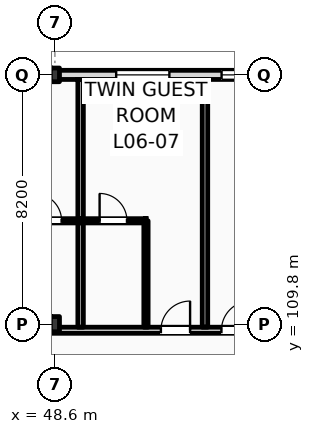
"""IFC4 building model, lengths in metres.
Left out: names, types, materials, properties, quantities, classifications, styles, units other than length and angle.
Written with IfcOpenShell. Run it as: python <this file> out.ifc"""

import sys

from ifc_helpers import new_model, si_unit, direction, frame, frame_2d, origin, origin_2d, place, context, subcontext, project, spatial, rectangle, i_section, extrude, element, fill, save


model = new_model("IFC4")
c1 = context("Model", 3, precision=1e-05, world=origin(), true_north=direction((0.0, 1.0)))
c2 = subcontext(c1, "Body", "Model", "MODEL_VIEW")
j1 = project(units=[si_unit("LENGTHUNIT", "METRE"), si_unit("PLANEANGLEUNIT", "RADIAN")], contexts=[c1])
p1 = place(None, origin())
s1 = spatial("IfcSite", under=j1, at=p1, CompositionType="ELEMENT")
p2 = place(p1, origin())
s2 = spatial("IfcBuilding", under=s1, at=p2, CompositionType="ELEMENT")
p3 = place(p2, frame((0.0, 0.0, 28.2)))
s3 = spatial("IfcBuildingStorey", under=s2, at=p3, CompositionType="ELEMENT", Elevation=28.2)
p4 = place(p3, frame((48.6, 109.8, 0.0), z_axis=(0.0, 0.0, 1.0), x_axis=(1.0, 0.0, 0.0)))
e1 = element("IfcColumn", 1, at=p4, inside=s3, PredefinedType="COLUMN", context=c2, shape_type="SweptSolid", body=[
    extrude(i_section(OverallWidth=0.3, OverallDepth=0.5, WebThickness=0.014, FlangeThickness=0.028, FilletRadius=0.027, at=origin_2d()), origin(), (0.0, 0.0, 1.0), 3.6),
])
p5 = place(p3, frame((48.6, 118.0, 0.0), z_axis=(0.0, 0.0, 1.0), x_axis=(1.0, 0.0, 0.0)))
e2 = element("IfcColumn", 2, at=p5, inside=s3, PredefinedType="COLUMN", context=c2, shape_type="SweptSolid", body=[
    extrude(i_section(OverallWidth=0.3, OverallDepth=0.45, WebThickness=0.014, FlangeThickness=0.026, FilletRadius=0.027, at=origin_2d()), origin(), (0.0, 0.0, 1.0), 3.6),
])
p6 = place(p3, frame((22.5, 118.0, 0.0), z_axis=(0.0, 0.0, 1.0), x_axis=(1.0, 0.0, 0.0)))
e3 = element("IfcWall", 3, at=p6, inside=s3, PredefinedType="STANDARD", context=c2, shape_type="SweptSolid", body=[
    extrude(rectangle(XDim=97.5, YDim=0.3, at=frame_2d((48.75, 0.0))), origin(), (0.0, 0.0, 1.0), 2.8),
])
p7 = place(p6, frame((0.91, 0.0, 0.9)))
e4 = element("IfcOpeningElement", 4, at=p7, cuts=e3, PredefinedType="OPENING", context=c2, shape_type="SweptSolid", body=[
    extrude(rectangle(XDim=0.9, YDim=1.72, at=frame_2d((0.45, 0.86))), frame((0.0, 0.16, 0.0), z_axis=(0.0, -1.0, 0.0), x_axis=(1.0, 0.0, 0.0)), (0.0, 0.0, 1.0), 0.32),
])
p8 = place(p6, frame((6.561, 0.0, 0.0)))
e5 = element("IfcOpeningElement", 5, at=p8, cuts=e3, PredefinedType="OPENING", context=c2, shape_type="SweptSolid", body=[
    extrude(rectangle(XDim=1.2, YDim=2.25, at=frame_2d((0.6, 1.125))), frame((0.0, 0.16, 0.0), z_axis=(0.0, -1.0, 0.0), x_axis=(1.0, 0.0, 0.0)), (0.0, 0.0, 1.0), 0.32),
])
p9 = place(p6, frame((11.477, 0.0, 0.9)))
e6 = element("IfcOpeningElement", 6, at=p9, cuts=e3, PredefinedType="OPENING", context=c2, shape_type="SweptSolid", body=[
    extrude(rectangle(XDim=1.1, YDim=1.5, at=frame_2d((0.55, 0.75))), frame((0.0, 0.16, 0.0), z_axis=(0.0, -1.0, 0.0), x_axis=(1.0, 0.0, 0.0)), (0.0, 0.0, 1.0), 0.32),
])
p10 = place(p6, frame((15.194, 0.0, 0.9)))
e7 = element("IfcOpeningElement", 7, at=p10, cuts=e3, PredefinedType="OPENING", context=c2, shape_type="SweptSolid", body=[
    extrude(rectangle(XDim=1.25, YDim=1.6, at=frame_2d((0.625, 0.8))), frame((0.0, 0.16, 0.0), z_axis=(0.0, -1.0, 0.0), x_axis=(1.0, 0.0, 0.0)), (0.0, 0.0, 1.0), 0.32),
])
p11 = place(p6, frame((19.509, 0.0, 0.9)))
e8 = element("IfcOpeningElement", 8, at=p11, cuts=e3, PredefinedType="OPENING", context=c2, shape_type="SweptSolid", body=[
    extrude(rectangle(XDim=1.4, YDim=1.7, at=frame_2d((0.7, 0.85))), frame((0.0, 0.16, 0.0), z_axis=(0.0, -1.0, 0.0), x_axis=(1.0, 0.0, 0.0)), (0.0, 0.0, 1.0), 0.32),
])
p12 = place(p6, frame((23.258, 0.0, 0.0)))
e9 = element("IfcOpeningElement", 9, at=p12, cuts=e3, PredefinedType="OPENING", context=c2, shape_type="SweptSolid", body=[
    extrude(rectangle(XDim=1.2, YDim=2.25, at=frame_2d((0.6, 1.125))), frame((0.0, 0.16, 0.0), z_axis=(0.0, -1.0, 0.0), x_axis=(1.0, 0.0, 0.0)), (0.0, 0.0, 1.0), 0.32),
])
p13 = place(p6, frame((28.115, 0.0, 0.9)))
e10 = element("IfcOpeningElement", 10, at=p13, cuts=e3, PredefinedType="OPENING", context=c2, shape_type="SweptSolid", body=[
    extrude(rectangle(XDim=1.75, YDim=1.72, at=frame_2d((0.875, 0.86))), frame((0.0, 0.16, 0.0), z_axis=(0.0, -1.0, 0.0), x_axis=(1.0, 0.0, 0.0)), (0.0, 0.0, 1.0), 0.32),
])
p14 = place(p6, frame((31.582, 0.0, 0.9)))
e11 = element("IfcOpeningElement", 11, at=p14, cuts=e3, PredefinedType="OPENING", context=c2, shape_type="SweptSolid", body=[
    extrude(rectangle(XDim=1.35, YDim=1.72, at=frame_2d((0.675, 0.86))), frame((0.0, 0.16, 0.0), z_axis=(0.0, -1.0, 0.0), x_axis=(1.0, 0.0, 0.0)), (0.0, 0.0, 1.0), 0.32),
])
p15 = place(p6, frame((37.379, 0.0, 0.0)))
e12 = element("IfcOpeningElement", 12, at=p15, cuts=e3, PredefinedType="OPENING", context=c2, shape_type="SweptSolid", body=[
    extrude(rectangle(XDim=1.2, YDim=2.25, at=frame_2d((0.6, 1.125))), frame((0.0, 0.16, 0.0), z_axis=(0.0, -1.0, 0.0), x_axis=(1.0, 0.0, 0.0)), (0.0, 0.0, 1.0), 0.32),
])
p16 = place(p6, frame((42.663, 0.0, 0.9)))
e13 = element("IfcOpeningElement", 13, at=p16, cuts=e3, PredefinedType="OPENING", context=c2, shape_type="SweptSolid", body=[
    extrude(rectangle(XDim=1.35, YDim=1.72, at=frame_2d((0.675, 0.86))), frame((0.0, 0.16, 0.0), z_axis=(0.0, -1.0, 0.0), x_axis=(1.0, 0.0, 0.0)), (0.0, 0.0, 1.0), 0.32),
])
p17 = place(p6, frame((45.119, 0.0, 0.9)))
e14 = element("IfcOpeningElement", 14, at=p17, cuts=e3, PredefinedType="OPENING", context=c2, shape_type="SweptSolid", body=[
    extrude(rectangle(XDim=2.871, YDim=1.72, at=frame_2d((1.436, 0.86))), frame((0.0, 0.16, 0.0), z_axis=(0.0, -1.0, 0.0), x_axis=(1.0, 0.0, 0.0)), (0.0, 0.0, 1.0), 0.32),
])
p18 = place(p6, frame((50.41, 0.0, 0.9)))
e15 = element("IfcOpeningElement", 15, at=p18, cuts=e3, PredefinedType="OPENING", context=c2, shape_type="SweptSolid", body=[
    extrude(rectangle(XDim=1.8, YDim=1.72, at=frame_2d((0.9, 0.86))), frame((0.0, 0.16, 0.0), z_axis=(0.0, -1.0, 0.0), x_axis=(1.0, 0.0, 0.0)), (0.0, 0.0, 1.0), 0.32),
])
p19 = place(p6, frame((54.375, 0.0, 0.0)))
e16 = element("IfcOpeningElement", 16, at=p19, cuts=e3, PredefinedType="OPENING", context=c2, shape_type="SweptSolid", body=[
    extrude(rectangle(XDim=1.2, YDim=2.25, at=frame_2d((0.6, 1.125))), frame((0.0, 0.16, 0.0), z_axis=(0.0, -1.0, 0.0), x_axis=(1.0, 0.0, 0.0)), (0.0, 0.0, 1.0), 0.32),
])
p20 = place(p6, frame((59.052, 0.0, 0.9)))
e17 = element("IfcOpeningElement", 17, at=p20, cuts=e3, PredefinedType="OPENING", context=c2, shape_type="SweptSolid", body=[
    extrude(rectangle(XDim=1.35, YDim=1.72, at=frame_2d((0.675, 0.86))), frame((0.0, 0.16, 0.0), z_axis=(0.0, -1.0, 0.0), x_axis=(1.0, 0.0, 0.0)), (0.0, 0.0, 1.0), 0.32),
])
p21 = place(p6, frame((62.768, 0.0, 0.9)))
e18 = element("IfcOpeningElement", 18, at=p21, cuts=e3, PredefinedType="OPENING", context=c2, shape_type="SweptSolid", body=[
    extrude(rectangle(XDim=1.5, YDim=1.72, at=frame_2d((0.75, 0.86))), frame((0.0, 0.16, 0.0), z_axis=(0.0, -1.0, 0.0), x_axis=(1.0, 0.0, 0.0)), (0.0, 0.0, 1.0), 0.32),
])
p22 = place(p6, frame((68.498, 0.0, 0.0)))
e19 = element("IfcOpeningElement", 19, at=p22, cuts=e3, PredefinedType="OPENING", context=c2, shape_type="SweptSolid", body=[
    extrude(rectangle(XDim=1.2, YDim=2.25, at=frame_2d((0.6, 1.125))), frame((0.0, 0.16, 0.0), z_axis=(0.0, -1.0, 0.0), x_axis=(1.0, 0.0, 0.0)), (0.0, 0.0, 1.0), 0.32),
])
p23 = place(p6, frame((71.265, 0.0, 0.9)))
e20 = element("IfcOpeningElement", 20, at=p23, cuts=e3, PredefinedType="OPENING", context=c2, shape_type="SweptSolid", body=[
    extrude(rectangle(XDim=0.9, YDim=1.72, at=frame_2d((0.45, 0.86))), frame((0.0, 0.16, 0.0), z_axis=(0.0, -1.0, 0.0), x_axis=(1.0, 0.0, 0.0)), (0.0, 0.0, 1.0), 0.32),
])
p24 = place(p6, frame((76.316, 0.0, 0.9)))
e21 = element("IfcOpeningElement", 21, at=p24, cuts=e3, PredefinedType="OPENING", context=c2, shape_type="SweptSolid", body=[
    extrude(rectangle(XDim=1.95, YDim=1.72, at=frame_2d((0.975, 0.86))), frame((0.0, 0.16, 0.0), z_axis=(0.0, -1.0, 0.0), x_axis=(1.0, 0.0, 0.0)), (0.0, 0.0, 1.0), 0.32),
])
p25 = place(p6, frame((81.632, 0.0, 0.9)))
e22 = element("IfcOpeningElement", 22, at=p25, cuts=e3, PredefinedType="OPENING", context=c2, shape_type="SweptSolid", body=[
    extrude(rectangle(XDim=1.35, YDim=1.72, at=frame_2d((0.675, 0.86))), frame((0.0, 0.16, 0.0), z_axis=(0.0, -1.0, 0.0), x_axis=(1.0, 0.0, 0.0)), (0.0, 0.0, 1.0), 0.32),
])
p26 = place(p6, frame((84.948, 0.0, 0.9)))
e23 = element("IfcOpeningElement", 23, at=p26, cuts=e3, PredefinedType="OPENING", context=c2, shape_type="SweptSolid", body=[
    extrude(rectangle(XDim=2.25, YDim=1.72, at=frame_2d((1.125, 0.86))), frame((0.0, 0.16, 0.0), z_axis=(0.0, -1.0, 0.0), x_axis=(1.0, 0.0, 0.0)), (0.0, 0.0, 1.0), 0.32),
])
p27 = place(p6, frame((90.063, 0.0, 0.9)))
e24 = element("IfcOpeningElement", 24, at=p27, cuts=e3, PredefinedType="OPENING", context=c2, shape_type="SweptSolid", body=[
    extrude(rectangle(XDim=1.8, YDim=1.72, at=frame_2d((0.9, 0.86))), frame((0.0, 0.16, 0.0), z_axis=(0.0, -1.0, 0.0), x_axis=(1.0, 0.0, 0.0)), (0.0, 0.0, 1.0), 0.32),
])
p28 = place(p6, frame((93.529, 0.0, 0.9)))
e25 = element("IfcOpeningElement", 25, at=p28, cuts=e3, PredefinedType="OPENING", context=c2, shape_type="SweptSolid", body=[
    extrude(rectangle(XDim=2.55, YDim=1.72, at=frame_2d((1.275, 0.86))), frame((0.0, 0.16, 0.0), z_axis=(0.0, -1.0, 0.0), x_axis=(1.0, 0.0, 0.0)), (0.0, 0.0, 1.0), 0.32),
])
p29 = place(p3, frame((10.65, 109.6, 0.0), z_axis=(0.0, 0.0, 1.0), x_axis=(1.0, 0.0, 0.0)))
e26 = element("IfcWall", 26, at=p29, inside=s3, PredefinedType="PARTITIONING", context=c2, shape_type="SweptSolid", body=[
    extrude(rectangle(XDim=109.21, YDim=0.2, at=frame_2d((54.605, 0.0))), origin(), (0.0, 0.0, 1.0), 2.8),
])
p30 = place(p29, frame((12.611, 0.0, 0.0)))
e27 = element("IfcOpeningElement", 27, at=p30, cuts=e26, PredefinedType="OPENING", context=c2, shape_type="SweptSolid", body=[
    extrude(rectangle(XDim=1.02, YDim=2.2, at=frame_2d((0.51, 1.1))), frame((0.0, 0.11, 0.0), z_axis=(0.0, -1.0, 0.0), x_axis=(1.0, 0.0, 0.0)), (0.0, 0.0, 1.0), 0.22),
])
p31 = place(p29, frame((19.451, 0.0, 0.0)))
e28 = element("IfcOpeningElement", 28, at=p31, cuts=e26, PredefinedType="OPENING", context=c2, shape_type="SweptSolid", body=[
    extrude(rectangle(XDim=1.02, YDim=2.2, at=frame_2d((0.51, 1.1))), frame((0.0, 0.11, 0.0), z_axis=(0.0, -1.0, 0.0), x_axis=(1.0, 0.0, 0.0)), (0.0, 0.0, 1.0), 0.22),
])
p32 = place(p29, frame((23.842, 0.0, 0.0)))
e29 = element("IfcOpeningElement", 29, at=p32, cuts=e26, PredefinedType="OPENING", context=c2, shape_type="SweptSolid", body=[
    extrude(rectangle(XDim=1.02, YDim=2.2, at=frame_2d((0.51, 1.1))), frame((0.0, 0.11, 0.0), z_axis=(0.0, -1.0, 0.0), x_axis=(1.0, 0.0, 0.0)), (0.0, 0.0, 1.0), 0.22),
])
p33 = place(p29, frame((26.084, 0.0, 0.0)))
e30 = element("IfcOpeningElement", 30, at=p33, cuts=e26, PredefinedType="OPENING", context=c2, shape_type="SweptSolid", body=[
    extrude(rectangle(XDim=1.02, YDim=2.2, at=frame_2d((0.51, 1.1))), frame((0.0, 0.11, 0.0), z_axis=(0.0, -1.0, 0.0), x_axis=(1.0, 0.0, 0.0)), (0.0, 0.0, 1.0), 0.22),
])
p34 = place(p29, frame((32.655, 0.0, 0.0)))
e31 = element("IfcOpeningElement", 31, at=p34, cuts=e26, PredefinedType="OPENING", context=c2, shape_type="SweptSolid", body=[
    extrude(rectangle(XDim=0.96, YDim=2.2, at=frame_2d((0.48, 1.1))), frame((0.0, 0.11, 0.0), z_axis=(0.0, -1.0, 0.0), x_axis=(1.0, 0.0, 0.0)), (0.0, 0.0, 1.0), 0.22),
])
p35 = place(p29, frame((34.895, 0.0, 0.0)))
e32 = element("IfcOpeningElement", 32, at=p35, cuts=e26, PredefinedType="OPENING", context=c2, shape_type="SweptSolid", body=[
    extrude(rectangle(XDim=0.96, YDim=2.2, at=frame_2d((0.48, 1.1))), frame((0.0, 0.11, 0.0), z_axis=(0.0, -1.0, 0.0), x_axis=(1.0, 0.0, 0.0)), (0.0, 0.0, 1.0), 0.22),
])
p36 = place(p29, frame((41.436, 0.0, 0.0)))
e33 = element("IfcOpeningElement", 33, at=p36, cuts=e26, PredefinedType="OPENING", context=c2, shape_type="SweptSolid", body=[
    extrude(rectangle(XDim=0.96, YDim=2.2, at=frame_2d((0.48, 1.1))), frame((0.0, 0.11, 0.0), z_axis=(0.0, -1.0, 0.0), x_axis=(1.0, 0.0, 0.0)), (0.0, 0.0, 1.0), 0.22),
])
p37 = place(p29, frame((43.427, 0.0, 0.0)))
e34 = element("IfcOpeningElement", 34, at=p37, cuts=e26, PredefinedType="OPENING", context=c2, shape_type="SweptSolid", body=[
    extrude(rectangle(XDim=0.96, YDim=2.2, at=frame_2d((0.48, 1.1))), frame((0.0, 0.11, 0.0), z_axis=(0.0, -1.0, 0.0), x_axis=(1.0, 0.0, 0.0)), (0.0, 0.0, 1.0), 0.22),
])
p38 = place(p29, frame((50.218, 0.0, 0.0)))
e35 = element("IfcOpeningElement", 35, at=p38, cuts=e26, PredefinedType="OPENING", context=c2, shape_type="SweptSolid", body=[
    extrude(rectangle(XDim=0.96, YDim=2.2, at=frame_2d((0.48, 1.1))), frame((0.0, 0.11, 0.0), z_axis=(0.0, -1.0, 0.0), x_axis=(1.0, 0.0, 0.0)), (0.0, 0.0, 1.0), 0.22),
])
p39 = place(p29, frame((54.859, 0.0, 0.0)))
e36 = element("IfcOpeningElement", 36, at=p39, cuts=e26, PredefinedType="OPENING", context=c2, shape_type="SweptSolid", body=[
    extrude(rectangle(XDim=0.96, YDim=2.2, at=frame_2d((0.48, 1.1))), frame((0.0, 0.11, 0.0), z_axis=(0.0, -1.0, 0.0), x_axis=(1.0, 0.0, 0.0)), (0.0, 0.0, 1.0), 0.22),
])
p40 = place(p29, frame((59.0, 0.0, 0.0)))
e37 = element("IfcOpeningElement", 37, at=p40, cuts=e26, PredefinedType="OPENING", context=c2, shape_type="SweptSolid", body=[
    extrude(rectangle(XDim=0.96, YDim=2.2, at=frame_2d((0.48, 1.1))), frame((0.0, 0.11, 0.0), z_axis=(0.0, -1.0, 0.0), x_axis=(1.0, 0.0, 0.0)), (0.0, 0.0, 1.0), 0.22),
])
p41 = place(p29, frame((63.39, 0.0, 0.0)))
e38 = element("IfcOpeningElement", 38, at=p41, cuts=e26, PredefinedType="OPENING", context=c2, shape_type="SweptSolid", body=[
    extrude(rectangle(XDim=0.96, YDim=2.2, at=frame_2d((0.48, 1.1))), frame((0.0, 0.11, 0.0), z_axis=(0.0, -1.0, 0.0), x_axis=(1.0, 0.0, 0.0)), (0.0, 0.0, 1.0), 0.22),
])
p42 = place(p29, frame((65.631, 0.0, 0.0)))
e39 = element("IfcOpeningElement", 39, at=p42, cuts=e26, PredefinedType="OPENING", context=c2, shape_type="SweptSolid", body=[
    extrude(rectangle(XDim=0.96, YDim=2.2, at=frame_2d((0.48, 1.1))), frame((0.0, 0.11, 0.0), z_axis=(0.0, -1.0, 0.0), x_axis=(1.0, 0.0, 0.0)), (0.0, 0.0, 1.0), 0.22),
])
p43 = place(p29, frame((72.172, 0.0, 0.0)))
e40 = element("IfcOpeningElement", 40, at=p43, cuts=e26, PredefinedType="OPENING", context=c2, shape_type="SweptSolid", body=[
    extrude(rectangle(XDim=0.96, YDim=2.2, at=frame_2d((0.48, 1.1))), frame((0.0, 0.11, 0.0), z_axis=(0.0, -1.0, 0.0), x_axis=(1.0, 0.0, 0.0)), (0.0, 0.0, 1.0), 0.22),
])
p44 = place(p29, frame((74.413, 0.0, 0.0)))
e41 = element("IfcOpeningElement", 41, at=p44, cuts=e26, PredefinedType="OPENING", context=c2, shape_type="SweptSolid", body=[
    extrude(rectangle(XDim=0.96, YDim=2.2, at=frame_2d((0.48, 1.1))), frame((0.0, 0.11, 0.0), z_axis=(0.0, -1.0, 0.0), x_axis=(1.0, 0.0, 0.0)), (0.0, 0.0, 1.0), 0.22),
])
p45 = place(p29, frame((80.954, 0.0, 0.0)))
e42 = element("IfcOpeningElement", 42, at=p45, cuts=e26, PredefinedType="OPENING", context=c2, shape_type="SweptSolid", body=[
    extrude(rectangle(XDim=0.96, YDim=2.2, at=frame_2d((0.48, 1.1))), frame((0.0, 0.11, 0.0), z_axis=(0.0, -1.0, 0.0), x_axis=(1.0, 0.0, 0.0)), (0.0, 0.0, 1.0), 0.22),
])
p46 = place(p29, frame((83.195, 0.0, 0.0)))
e43 = element("IfcOpeningElement", 43, at=p46, cuts=e26, PredefinedType="OPENING", context=c2, shape_type="SweptSolid", body=[
    extrude(rectangle(XDim=0.96, YDim=2.2, at=frame_2d((0.48, 1.1))), frame((0.0, 0.11, 0.0), z_axis=(0.0, -1.0, 0.0), x_axis=(1.0, 0.0, 0.0)), (0.0, 0.0, 1.0), 0.22),
])
p47 = place(p29, frame((89.735, 0.0, 0.0)))
e44 = element("IfcOpeningElement", 44, at=p47, cuts=e26, PredefinedType="OPENING", context=c2, shape_type="SweptSolid", body=[
    extrude(rectangle(XDim=0.96, YDim=2.2, at=frame_2d((0.48, 1.1))), frame((0.0, 0.11, 0.0), z_axis=(0.0, -1.0, 0.0), x_axis=(1.0, 0.0, 0.0)), (0.0, 0.0, 1.0), 0.22),
])
p48 = place(p29, frame((94.126, 0.0, 0.0)))
e45 = element("IfcOpeningElement", 45, at=p48, cuts=e26, PredefinedType="OPENING", context=c2, shape_type="SweptSolid", body=[
    extrude(rectangle(XDim=0.96, YDim=2.2, at=frame_2d((0.48, 1.1))), frame((0.0, 0.11, 0.0), z_axis=(0.0, -1.0, 0.0), x_axis=(1.0, 0.0, 0.0)), (0.0, 0.0, 1.0), 0.22),
])
p49 = place(p29, frame((98.517, 0.0, 0.0)))
e46 = element("IfcOpeningElement", 46, at=p49, cuts=e26, PredefinedType="OPENING", context=c2, shape_type="SweptSolid", body=[
    extrude(rectangle(XDim=0.96, YDim=2.2, at=frame_2d((0.48, 1.1))), frame((0.0, 0.11, 0.0), z_axis=(0.0, -1.0, 0.0), x_axis=(1.0, 0.0, 0.0)), (0.0, 0.0, 1.0), 0.22),
])
p50 = place(p29, frame((102.908, 0.0, 0.0)))
e47 = element("IfcOpeningElement", 47, at=p50, cuts=e26, PredefinedType="OPENING", context=c2, shape_type="SweptSolid", body=[
    extrude(rectangle(XDim=0.96, YDim=2.2, at=frame_2d((0.48, 1.1))), frame((0.0, 0.11, 0.0), z_axis=(0.0, -1.0, 0.0), x_axis=(1.0, 0.0, 0.0)), (0.0, 0.0, 1.0), 0.22),
])
p51 = place(p29, frame((105.099, 0.0, 0.0)))
e48 = element("IfcOpeningElement", 48, at=p51, cuts=e26, PredefinedType="OPENING", context=c2, shape_type="SweptSolid", body=[
    extrude(rectangle(XDim=0.96, YDim=2.2, at=frame_2d((0.48, 1.1))), frame((0.0, 0.11, 0.0), z_axis=(0.0, -1.0, 0.0), x_axis=(1.0, 0.0, 0.0)), (0.0, 0.0, 1.0), 0.22),
])
p52 = place(p29, frame((2.716, 0.0, 0.0)))
e49 = element("IfcOpeningElement", 49, at=p52, cuts=e26, PredefinedType="OPENING", context=c2, shape_type="SweptSolid", body=[
    extrude(rectangle(XDim=1.35, YDim=2.25, at=frame_2d((0.675, 1.125))), frame((0.0, 0.11, 0.0), z_axis=(0.0, -1.0, 0.0), x_axis=(1.0, 0.0, 0.0)), (0.0, 0.0, 1.0), 0.22),
])
p53 = place(p29, frame((6.65, 0.0, 0.0)))
e50 = element("IfcOpeningElement", 50, at=p53, cuts=e26, PredefinedType="OPENING", context=c2, shape_type="SweptSolid", body=[
    extrude(rectangle(XDim=1.35, YDim=2.25, at=frame_2d((0.675, 1.125))), frame((0.0, 0.11, 0.0), z_axis=(0.0, -1.0, 0.0), x_axis=(1.0, 0.0, 0.0)), (0.0, 0.0, 1.0), 0.22),
])
p54 = place(p29, frame((10.583, 0.0, 0.0)))
e51 = element("IfcOpeningElement", 51, at=p54, cuts=e26, PredefinedType="OPENING", context=c2, shape_type="SweptSolid", body=[
    extrude(rectangle(XDim=1.35, YDim=2.25, at=frame_2d((0.675, 1.125))), frame((0.0, 0.11, 0.0), z_axis=(0.0, -1.0, 0.0), x_axis=(1.0, 0.0, 0.0)), (0.0, 0.0, 1.0), 0.22),
])
p55 = place(p3, frame((49.445, 109.7, 0.0), z_axis=(0.0, 0.0, 1.0), x_axis=(0.0, 1.0, 0.0)))
e52 = element("IfcWall", 52, at=p55, inside=s3, PredefinedType="PARTITIONING", context=c2, shape_type="SweptSolid", body=[
    extrude(rectangle(XDim=8.15, YDim=0.18, at=frame_2d((4.075, 0.0))), origin(), (0.0, 0.0, 1.0), 3.36),
])
p56 = place(p3, frame((47.295, 113.2, 0.0), z_axis=(0.0, 0.0, 1.0), x_axis=(1.0, 0.0, 0.0)))
e53 = element("IfcWall", 53, at=p56, inside=s3, PredefinedType="PARTITIONING", context=c2, shape_type="SweptSolid", body=[
    extrude(rectangle(XDim=2.15, YDim=0.14, at=frame_2d((1.075, 0.0))), origin(), (0.0, 0.0, 1.0), 3.36),
])
p57 = place(p56, frame((0.625, 0.0, 0.0)))
e54 = element("IfcOpeningElement", 54, at=p57, cuts=e53, PredefinedType="OPENING", context=c2, shape_type="SweptSolid", body=[
    extrude(rectangle(XDim=0.9, YDim=2.1, at=frame_2d((0.45, 1.05))), frame((0.0, 0.08, 0.0), z_axis=(0.0, -1.0, 0.0), x_axis=(1.0, 0.0, 0.0)), (0.0, 0.0, 1.0), 0.16),
])
p58 = place(p3, frame((53.536, 109.7, 0.0), z_axis=(0.0, 0.0, 1.0), x_axis=(0.0, 1.0, 0.0)))
e55 = element("IfcWall", 55, at=p58, inside=s3, PredefinedType="PARTITIONING", context=c2, shape_type="SweptSolid", body=[
    extrude(rectangle(XDim=8.15, YDim=0.18, at=frame_2d((4.075, 0.0))), origin(), (0.0, 0.0, 1.0), 3.36),
])
p59 = place(p3, frame((51.595, 109.7, 0.0), z_axis=(0.0, 0.0, 1.0), x_axis=(0.0, 1.0, 0.0)))
e56 = element("IfcWall", 56, at=p59, inside=s3, PredefinedType="PARTITIONING", context=c2, shape_type="SweptSolid", body=[
    extrude(rectangle(XDim=3.5, YDim=0.14, at=frame_2d((1.75, 0.0))), origin(), (0.0, 0.0, 1.0), 3.36),
])
p60 = place(p3, frame((49.445, 113.2, 0.0), z_axis=(0.0, 0.0, 1.0), x_axis=(1.0, 0.0, 0.0)))
e57 = element("IfcWall", 57, at=p60, inside=s3, PredefinedType="PARTITIONING", context=c2, shape_type="SweptSolid", body=[
    extrude(rectangle(XDim=2.15, YDim=0.14, at=frame_2d((1.075, 0.0))), origin(), (0.0, 0.0, 1.0), 3.36),
])
p61 = place(p60, frame((0.625, 0.0, 0.0)))
e58 = element("IfcOpeningElement", 58, at=p61, cuts=e57, PredefinedType="OPENING", context=c2, shape_type="SweptSolid", body=[
    extrude(rectangle(XDim=0.9, YDim=2.1, at=frame_2d((0.45, 1.05))), frame((0.0, 0.08, 0.0), z_axis=(0.0, -1.0, 0.0), x_axis=(1.0, 0.0, 0.0)), (0.0, 0.0, 1.0), 0.16),
])
p62 = place(p13, origin())
e59 = element("IfcWindow", 59, at=p62, inside=s3, PartitioningType="DOUBLE_PANEL_VERTICAL", PredefinedType="WINDOW", context=c2, shape_type="SweptSolid", body=[
    extrude(rectangle(XDim=1.75, YDim=1.72, at=frame_2d((0.875, 0.86))), frame((0.0, 0.03, 0.0), z_axis=(0.0, -1.0, 0.0), x_axis=(1.0, 0.0, 0.0)), (0.0, 0.0, 1.0), 0.06),
])
fill(e10, e59)
p63 = place(p14, origin())
e60 = element("IfcWindow", 60, at=p63, inside=s3, PartitioningType="DOUBLE_PANEL_VERTICAL", PredefinedType="WINDOW", context=c2, shape_type="SweptSolid", body=[
    extrude(rectangle(XDim=1.35, YDim=1.72, at=frame_2d((0.675, 0.86))), frame((0.0, 0.03, 0.0), z_axis=(0.0, -1.0, 0.0), x_axis=(1.0, 0.0, 0.0)), (0.0, 0.0, 1.0), 0.06),
])
fill(e11, e60)
p64 = place(p57, origin())
e61 = element("IfcDoor", 61, at=p64, inside=s3, OperationType="SINGLE_SWING_LEFT", PredefinedType="DOOR", context=c2, shape_type="SweptSolid", body=[
    extrude(rectangle(XDim=0.9, YDim=2.1, at=frame_2d((0.45, 1.05))), frame((0.0, 0.025, 0.0), z_axis=(0.0, -1.0, 0.0), x_axis=(1.0, 0.0, 0.0)), (0.0, 0.0, 1.0), 0.05),
])
fill(e54, e61)
p65 = place(p36, origin())
e62 = element("IfcDoor", 62, at=p65, inside=s3, OperationType="SINGLE_SWING_RIGHT", PredefinedType="DOOR", context=c2, shape_type="SweptSolid", body=[
    extrude(rectangle(XDim=0.96, YDim=2.2, at=frame_2d((0.48, 1.1))), frame((0.0, 0.025, 0.0), z_axis=(0.0, -1.0, 0.0), x_axis=(1.0, 0.0, 0.0)), (0.0, 0.0, 1.0), 0.05),
])
fill(e33, e62)
p66 = place(p61, origin())
e63 = element("IfcDoor", 63, at=p66, inside=s3, OperationType="SINGLE_SWING_LEFT", PredefinedType="DOOR", context=c2, shape_type="SweptSolid", body=[
    extrude(rectangle(XDim=0.9, YDim=2.1, at=frame_2d((0.45, 1.05))), frame((0.0, 0.025, 0.0), z_axis=(0.0, -1.0, 0.0), x_axis=(1.0, 0.0, 0.0)), (0.0, 0.0, 1.0), 0.05),
])
fill(e58, e63)
p67 = place(p37, origin())
e64 = element("IfcDoor", 64, at=p67, inside=s3, OperationType="SINGLE_SWING_RIGHT", PredefinedType="DOOR", context=c2, shape_type="SweptSolid", body=[
    extrude(rectangle(XDim=0.96, YDim=2.2, at=frame_2d((0.48, 1.1))), frame((0.0, 0.025, 0.0), z_axis=(0.0, -1.0, 0.0), x_axis=(1.0, 0.0, 0.0)), (0.0, 0.0, 1.0), 0.05),
])
fill(e34, e64)
save(model, sys.argv[1])
